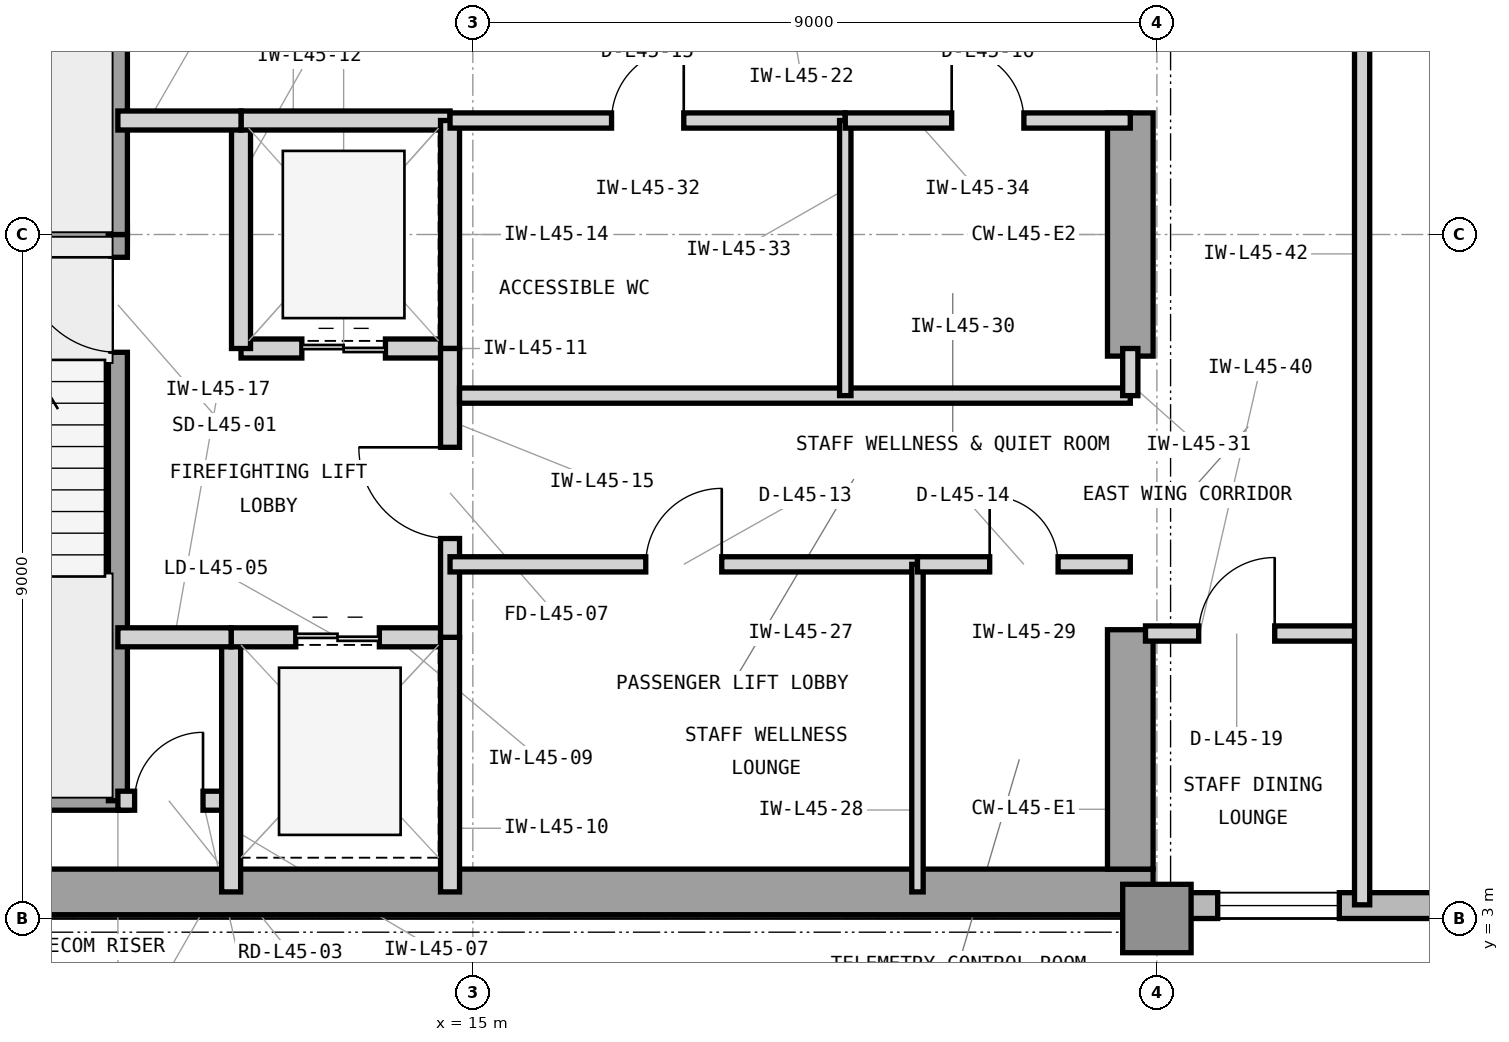
"""IFC4 building model, lengths in metres.
Left out: names, types, materials, properties, quantities, classifications, styles, units other than length and angle.
Written with IfcOpenShell. Run it as: python <this file> out.ifc"""

import sys

from ifc_helpers import new_model, si_unit, direction, frame, frame_2d, origin, origin_2d, place, context, subcontext, project, spatial, rectangle, extrude, element, fill, save


model = new_model("IFC4")
c1 = context("Model", 3, precision=1e-05, world=origin(), true_north=direction((0.0, 1.0)))
c2 = subcontext(c1, "Body", "Model", "MODEL_VIEW")
j1 = project(units=[si_unit("LENGTHUNIT", "METRE"), si_unit("PLANEANGLEUNIT", "RADIAN")], contexts=[c1])
p1 = place(None, origin())
s1 = spatial("IfcSite", under=j1, at=p1, CompositionType="ELEMENT")
p2 = place(p1, origin())
s2 = spatial("IfcBuilding", under=s1, at=p2, CompositionType="ELEMENT")
p3 = place(p2, frame((0.0, 0.0, 187.8)))
s3 = spatial("IfcBuildingStorey", under=s2, at=p3, CompositionType="ELEMENT", Elevation=187.8)
p4 = place(p3, frame((7.475, 3.35, 0.0), z_axis=(0.0, 0.0, 1.0), x_axis=(1.0, 0.0, 0.0)))
e1 = element("IfcWall", 1, at=p4, inside=s3, PredefinedType="SHEAR", context=c2, shape_type="SweptSolid", body=[
    extrude(rectangle(XDim=16.475, YDim=0.6, at=frame_2d((8.237, 0.0))), origin(), (0.0, 0.0, 1.0), 3.9),
])
p5 = place(p3, frame((23.65, 3.65, 0.0), z_axis=(0.0, 0.0, 1.0), x_axis=(0.0, 1.0, 0.0)))
e2 = element("IfcWall", 2, at=p5, inside=s3, PredefinedType="SHEAR", context=c2, shape_type="SweptSolid", body=[
    extrude(rectangle(XDim=3.15, YDim=0.6, at=frame_2d((1.575, 0.0))), origin(), (0.0, 0.0, 1.0), 3.9),
])
p6 = place(p3, frame((23.65, 10.4, 0.0), z_axis=(0.0, 0.0, 1.0), x_axis=(0.0, 1.0, 0.0)))
e3 = element("IfcWall", 3, at=p6, inside=s3, PredefinedType="SHEAR", context=c2, shape_type="SweptSolid", body=[
    extrude(rectangle(XDim=3.2, YDim=0.6, at=frame_2d((1.6, 0.0))), origin(), (0.0, 0.0, 1.0), 3.9),
])
p7 = place(p3, frame((24.0, 3.0, 0.0), z_axis=(0.0, 0.0, 1.0), x_axis=(1.0, 0.0, 0.0)))
e4 = element("IfcColumn", 4, at=p7, inside=s3, PredefinedType="COLUMN", context=c2, shape_type="SweptSolid", body=[
    extrude(rectangle(XDim=0.9, YDim=0.9, at=origin_2d()), origin(), (0.0, 0.0, 1.0), 3.9),
])
p8 = place(p3, frame((23.9, 3.17, 0.0), z_axis=(0.0, 0.0, 1.0), x_axis=(1.0, 0.0, 0.0)))
e5 = element("IfcWall", 5, at=p8, inside=s3, PredefinedType="STANDARD", context=c2, shape_type="SweptSolid", body=[
    extrude(rectangle(XDim=31.5, YDim=0.34, at=frame_2d((15.75, 0.0))), origin(), (0.0, 0.0, 1.0), 3.7),
])
p9 = place(p8, frame((5.6, 0.0, 0.9)))
e6 = element("IfcOpeningElement", 6, at=p9, cuts=e5, PredefinedType="OPENING", context=c2, shape_type="SweptSolid", body=[
    extrude(rectangle(XDim=2.3, YDim=2.2, at=frame_2d((1.15, 1.1))), frame((0.0, 0.18, 0.0), z_axis=(0.0, -1.0, 0.0), x_axis=(1.0, 0.0, 0.0)), (0.0, 0.0, 1.0), 0.36),
])
p10 = place(p8, frame((14.6, 0.0, 0.9)))
e7 = element("IfcOpeningElement", 7, at=p10, cuts=e5, PredefinedType="OPENING", context=c2, shape_type="SweptSolid", body=[
    extrude(rectangle(XDim=2.3, YDim=2.2, at=frame_2d((1.15, 1.1))), frame((0.0, 0.18, 0.0), z_axis=(0.0, -1.0, 0.0), x_axis=(1.0, 0.0, 0.0)), (0.0, 0.0, 1.0), 0.36),
])
p11 = place(p8, frame((19.1, 0.0, 0.9)))
e8 = element("IfcOpeningElement", 8, at=p11, cuts=e5, PredefinedType="OPENING", context=c2, shape_type="SweptSolid", body=[
    extrude(rectangle(XDim=2.3, YDim=2.2, at=frame_2d((1.15, 1.1))), frame((0.0, 0.18, 0.0), z_axis=(0.0, -1.0, 0.0), x_axis=(1.0, 0.0, 0.0)), (0.0, 0.0, 1.0), 0.36),
])
p12 = place(p8, frame((0.9, 0.0, 0.9)))
e9 = element("IfcOpeningElement", 9, at=p12, cuts=e5, PredefinedType="OPENING", context=c2, shape_type="SweptSolid", body=[
    extrude(rectangle(XDim=1.6, YDim=2.2, at=frame_2d((0.8, 1.1))), frame((0.0, 0.18, 0.0), z_axis=(0.0, -1.0, 0.0), x_axis=(1.0, 0.0, 0.0)), (0.0, 0.0, 1.0), 0.36),
])
p13 = place(p3, frame((6.35, 12.0, 0.0), z_axis=(0.0, 0.0, 1.0), x_axis=(1.0, 0.0, 0.0)))
e10 = element("IfcWall", 10, at=p13, inside=s3, PredefinedType="SHEAR", context=c2, shape_type="SweptSolid", body=[
    extrude(rectangle(XDim=4.105, YDim=0.25, at=frame_2d((2.052, 0.0))), origin(), (0.0, 0.0, 1.0), 3.9),
])
p14 = place(p3, frame((7.7, 4.55, 0.0), z_axis=(0.0, 0.0, 1.0), x_axis=(1.0, 0.0, 0.0)))
e11 = element("IfcWall", 11, at=p14, inside=s3, PredefinedType="SHEAR", context=c2, shape_type="SweptSolid", body=[
    extrude(rectangle(XDim=2.755, YDim=0.25, at=frame_2d((1.377, 0.0))), origin(), (0.0, 0.0, 1.0), 3.9),
])
p15 = place(p3, frame((10.33, 4.55, 0.0), z_axis=(0.0, 0.0, 1.0), x_axis=(0.0, 1.0, 0.0)))
e12 = element("IfcWall", 12, at=p15, inside=s3, PredefinedType="SHEAR", context=c2, shape_type="SweptSolid", body=[
    extrude(rectangle(XDim=7.45, YDim=0.25, at=frame_2d((3.725, 0.0))), origin(), (0.0, 0.0, 1.0), 3.9),
])
p16 = place(p15, frame((5.9, 0.0, 0.0)))
e13 = element("IfcOpeningElement", 13, at=p16, cuts=e12, PredefinedType="OPENING", context=c2, shape_type="SweptSolid", body=[
    extrude(rectangle(XDim=1.25, YDim=2.2, at=frame_2d((0.625, 1.1))), frame((0.0, 0.135, 0.0), z_axis=(0.0, -1.0, 0.0), x_axis=(1.0, 0.0, 0.0)), (0.0, 0.0, 1.0), 0.27),
])
p17 = place(p3, frame((10.33, 12.0, 0.0), z_axis=(0.0, 0.0, 1.0), x_axis=(0.0, 1.0, 0.0)))
e14 = element("IfcWall", 14, at=p17, inside=s3, PredefinedType="SHEAR", context=c2, shape_type="SweptSolid", body=[
    extrude(rectangle(XDim=7.45, YDim=0.25, at=frame_2d((3.725, 0.0))), origin(), (0.0, 0.0, 1.0), 3.9),
])
p18 = place(p17, frame((5.85, 0.0, 0.0)))
e15 = element("IfcOpeningElement", 15, at=p18, cuts=e14, PredefinedType="OPENING", context=c2, shape_type="SweptSolid", body=[
    extrude(rectangle(XDim=1.25, YDim=2.2, at=frame_2d((0.625, 1.1))), frame((0.0, 0.135, 0.0), z_axis=(0.0, -1.0, 0.0), x_axis=(1.0, 0.0, 0.0)), (0.0, 0.0, 1.0), 0.27),
])
p19 = place(p3, frame((10.33, 4.55, 0.0), z_axis=(0.0, 0.0, 1.0), x_axis=(1.0, 0.0, 0.0)))
e16 = element("IfcWall", 16, at=p19, inside=s3, PredefinedType="PARTITIONING", context=c2, shape_type="SweptSolid", body=[
    extrude(rectangle(XDim=1.49, YDim=0.25, at=frame_2d((0.745, 0.0))), origin(), (0.0, 0.0, 1.0), 3.69),
])
p20 = place(p19, frame((0.22, 0.0, 0.0)))
e17 = element("IfcOpeningElement", 17, at=p20, cuts=e16, PredefinedType="OPENING", context=c2, shape_type="SweptSolid", body=[
    extrude(rectangle(XDim=0.9, YDim=2.1, at=frame_2d((0.45, 1.05))), frame((0.0, 0.135, 0.0), z_axis=(0.0, -1.0, 0.0), x_axis=(1.0, 0.0, 0.0)), (0.0, 0.0, 1.0), 0.27),
])
p21 = place(p3, frame((11.82, 3.35, 0.0), z_axis=(0.0, 0.0, 1.0), x_axis=(0.0, 1.0, 0.0)))
e18 = element("IfcWall", 18, at=p21, inside=s3, PredefinedType="PARTITIONING", context=c2, shape_type="SweptSolid", body=[
    extrude(rectangle(XDim=3.35, YDim=0.25, at=frame_2d((1.675, 0.0))), origin(), (0.0, 0.0, 1.0), 3.69),
])
p22 = place(p3, frame((11.82, 6.7, 0.0), z_axis=(0.0, 0.0, 1.0), x_axis=(1.0, 0.0, 0.0)))
e19 = element("IfcWall", 19, at=p22, inside=s3, PredefinedType="PARTITIONING", context=c2, shape_type="SweptSolid", body=[
    extrude(rectangle(XDim=2.88, YDim=0.25, at=frame_2d((1.44, 0.0))), origin(), (0.0, 0.0, 1.0), 3.283),
])
p23 = place(p22, frame((0.85, 0.0, 0.0)))
e20 = element("IfcOpeningElement", 20, at=p23, cuts=e19, PredefinedType="OPENING", context=c2, shape_type="SweptSolid", body=[
    extrude(rectangle(XDim=1.1, YDim=2.25, at=frame_2d((0.55, 1.125))), frame((0.0, 0.135, 0.0), z_axis=(0.0, -1.0, 0.0), x_axis=(1.0, 0.0, 0.0)), (0.0, 0.0, 1.0), 0.27),
])
p24 = place(p3, frame((14.7, 3.35, 0.0), z_axis=(0.0, 0.0, 1.0), x_axis=(0.0, 1.0, 0.0)))
e21 = element("IfcWall", 21, at=p24, inside=s3, PredefinedType="PARTITIONING", context=c2, shape_type="SweptSolid", body=[
    extrude(rectangle(XDim=3.35, YDim=0.25, at=frame_2d((1.675, 0.0))), origin(), (0.0, 0.0, 1.0), 3.69),
])
p25 = place(p3, frame((11.95, 10.5, 0.0), z_axis=(0.0, 0.0, 1.0), x_axis=(1.0, 0.0, 0.0)))
e22 = element("IfcWall", 22, at=p25, inside=s3, PredefinedType="PARTITIONING", context=c2, shape_type="SweptSolid", body=[
    extrude(rectangle(XDim=2.75, YDim=0.25, at=frame_2d((1.375, 0.0))), origin(), (0.0, 0.0, 1.0), 3.283),
])
p26 = place(p25, frame((0.8, 0.0, 0.0)))
e23 = element("IfcOpeningElement", 23, at=p26, cuts=e22, PredefinedType="OPENING", context=c2, shape_type="SweptSolid", body=[
    extrude(rectangle(XDim=1.1, YDim=2.25, at=frame_2d((0.55, 1.125))), frame((0.0, 0.135, 0.0), z_axis=(0.0, -1.0, 0.0), x_axis=(1.0, 0.0, 0.0)), (0.0, 0.0, 1.0), 0.27),
])
p27 = place(p3, frame((11.95, 10.5, 0.0), z_axis=(0.0, 0.0, 1.0), x_axis=(0.0, 1.0, 0.0)))
e24 = element("IfcWall", 24, at=p27, inside=s3, PredefinedType="PARTITIONING", context=c2, shape_type="SweptSolid", body=[
    extrude(rectangle(XDim=3.0, YDim=0.25, at=frame_2d((1.5, 0.0))), origin(), (0.0, 0.0, 1.0), 3.69),
])
p28 = place(p3, frame((11.95, 13.5, 0.0), z_axis=(0.0, 0.0, 1.0), x_axis=(1.0, 0.0, 0.0)))
e25 = element("IfcWall", 25, at=p28, inside=s3, PredefinedType="PARTITIONING", context=c2, shape_type="SweptSolid", body=[
    extrude(rectangle(XDim=2.75, YDim=0.25, at=frame_2d((1.375, 0.0))), origin(), (0.0, 0.0, 1.0), 3.283),
])
p29 = place(p3, frame((14.7, 10.5, 0.0), z_axis=(0.0, 0.0, 1.0), x_axis=(0.0, 1.0, 0.0)))
e26 = element("IfcWall", 26, at=p29, inside=s3, PredefinedType="PARTITIONING", context=c2, shape_type="SweptSolid", body=[
    extrude(rectangle(XDim=3.0, YDim=0.25, at=frame_2d((1.5, 0.0))), origin(), (0.0, 0.0, 1.0), 3.69),
])
p30 = place(p3, frame((14.7, 6.7, 0.0), z_axis=(0.0, 0.0, 1.0), x_axis=(0.0, 1.0, 0.0)))
e27 = element("IfcWall", 27, at=p30, inside=s3, PredefinedType="PARTITIONING", context=c2, shape_type="SweptSolid", body=[
    extrude(rectangle(XDim=3.8, YDim=0.25, at=frame_2d((1.9, 0.0))), origin(), (0.0, 0.0, 1.0), 3.69),
])
p31 = place(p30, frame((1.3, 0.0, 0.0)))
e28 = element("IfcOpeningElement", 28, at=p31, cuts=e27, PredefinedType="OPENING", context=c2, shape_type="SweptSolid", body=[
    extrude(rectangle(XDim=1.2, YDim=2.2, at=frame_2d((0.6, 1.1))), frame((0.0, 0.135, 0.0), z_axis=(0.0, -1.0, 0.0), x_axis=(1.0, 0.0, 0.0)), (0.0, 0.0, 1.0), 0.27),
])
p32 = place(p3, frame((10.33, 13.5, 0.0), z_axis=(0.0, 0.0, 1.0), x_axis=(1.0, 0.0, 0.0)))
e29 = element("IfcWall", 29, at=p32, inside=s3, PredefinedType="PARTITIONING", context=c2, shape_type="SweptSolid", body=[
    extrude(rectangle(XDim=1.62, YDim=0.25, at=frame_2d((0.81, 0.0))), origin(), (0.0, 0.0, 1.0), 3.283),
])
p33 = place(p3, frame((10.33, 6.7, 0.0), z_axis=(0.0, 0.0, 1.0), x_axis=(1.0, 0.0, 0.0)))
e30 = element("IfcWall", 30, at=p33, inside=s3, PredefinedType="PARTITIONING", context=c2, shape_type="SweptSolid", body=[
    extrude(rectangle(XDim=1.49, YDim=0.25, at=frame_2d((0.745, 0.0))), origin(), (0.0, 0.0, 1.0), 3.283),
])
p34 = place(p3, frame((14.7, 7.66, 0.0), z_axis=(0.0, 0.0, 1.0), x_axis=(1.0, 0.0, 0.0)))
e31 = element("IfcWall", 31, at=p34, inside=s3, PredefinedType="PARTITIONING", context=c2, shape_type="SweptSolid", body=[
    extrude(rectangle(XDim=6.15, YDim=0.2, at=frame_2d((3.075, 0.0))), origin(), (0.0, 0.0, 1.0), 3.69),
])
p35 = place(p34, frame((2.575, 0.0, 0.0)))
e32 = element("IfcOpeningElement", 32, at=p35, cuts=e31, PredefinedType="OPENING", context=c2, shape_type="SweptSolid", body=[
    extrude(rectangle(XDim=1.0, YDim=2.15, at=frame_2d((0.5, 1.075))), frame((0.0, 0.11, 0.0), z_axis=(0.0, -1.0, 0.0), x_axis=(1.0, 0.0, 0.0)), (0.0, 0.0, 1.0), 0.22),
])
p36 = place(p3, frame((20.85, 3.35, 0.0), z_axis=(0.0, 0.0, 1.0), x_axis=(0.0, 1.0, 0.0)))
e33 = element("IfcWall", 33, at=p36, inside=s3, PredefinedType="PARTITIONING", context=c2, shape_type="SweptSolid", body=[
    extrude(rectangle(XDim=4.31, YDim=0.15, at=frame_2d((2.155, 0.0))), origin(), (0.0, 0.0, 1.0), 3.69),
])
p37 = place(p3, frame((20.85, 7.66, 0.0), z_axis=(0.0, 0.0, 1.0), x_axis=(1.0, 0.0, 0.0)))
e34 = element("IfcWall", 34, at=p37, inside=s3, PredefinedType="PARTITIONING", context=c2, shape_type="SweptSolid", body=[
    extrude(rectangle(XDim=2.8, YDim=0.2, at=frame_2d((1.4, 0.0))), origin(), (0.0, 0.0, 1.0), 3.69),
])
p38 = place(p37, frame((0.95, 0.0, 0.0)))
e35 = element("IfcOpeningElement", 35, at=p38, cuts=e34, PredefinedType="OPENING", context=c2, shape_type="SweptSolid", body=[
    extrude(rectangle(XDim=0.9, YDim=2.1, at=frame_2d((0.45, 1.05))), frame((0.0, 0.11, 0.0), z_axis=(0.0, -1.0, 0.0), x_axis=(1.0, 0.0, 0.0)), (0.0, 0.0, 1.0), 0.22),
])
p39 = place(p3, frame((14.825, 9.88, 0.0), z_axis=(0.0, 0.0, 1.0), x_axis=(1.0, 0.0, 0.0)))
e36 = element("IfcWall", 36, at=p39, inside=s3, PredefinedType="PARTITIONING", context=c2, shape_type="SweptSolid", body=[
    extrude(rectangle(XDim=8.825, YDim=0.2, at=frame_2d((4.413, 0.0))), origin(), (0.0, 0.0, 1.0), 3.69),
])
p40 = place(p3, frame((23.65, 9.88, 0.0), z_axis=(0.0, 0.0, 1.0), x_axis=(0.0, 1.0, 0.0)))
e37 = element("IfcWall", 37, at=p40, inside=s3, PredefinedType="PARTITIONING", context=c2, shape_type="SweptSolid", body=[
    extrude(rectangle(XDim=0.62, YDim=0.2, at=frame_2d((0.31, 0.0))), origin(), (0.0, 0.0, 1.0), 3.69),
])
p41 = place(p3, frame((14.7, 13.5, 0.0), z_axis=(0.0, 0.0, 1.0), x_axis=(1.0, 0.0, 0.0)))
e38 = element("IfcWall", 38, at=p41, inside=s3, PredefinedType="PARTITIONING", context=c2, shape_type="SweptSolid", body=[
    extrude(rectangle(XDim=5.2, YDim=0.2, at=frame_2d((2.6, 0.0))), origin(), (0.0, 0.0, 1.0), 3.283),
])
p42 = place(p41, frame((2.125, 0.0, 0.0)))
e39 = element("IfcOpeningElement", 39, at=p42, cuts=e38, PredefinedType="OPENING", context=c2, shape_type="SweptSolid", body=[
    extrude(rectangle(XDim=0.95, YDim=2.1, at=frame_2d((0.475, 1.05))), frame((0.0, 0.11, 0.0), z_axis=(0.0, -1.0, 0.0), x_axis=(1.0, 0.0, 0.0)), (0.0, 0.0, 1.0), 0.22),
])
p43 = place(p3, frame((19.9, 9.88, 0.0), z_axis=(0.0, 0.0, 1.0), x_axis=(0.0, 1.0, 0.0)))
e40 = element("IfcWall", 40, at=p43, inside=s3, PredefinedType="PARTITIONING", context=c2, shape_type="SweptSolid", body=[
    extrude(rectangle(XDim=3.62, YDim=0.15, at=frame_2d((1.81, 0.0))), origin(), (0.0, 0.0, 1.0), 3.69),
])
p44 = place(p3, frame((19.9, 13.5, 0.0), z_axis=(0.0, 0.0, 1.0), x_axis=(1.0, 0.0, 0.0)))
e41 = element("IfcWall", 41, at=p44, inside=s3, PredefinedType="PARTITIONING", context=c2, shape_type="SweptSolid", body=[
    extrude(rectangle(XDim=3.75, YDim=0.2, at=frame_2d((1.875, 0.0))), origin(), (0.0, 0.0, 1.0), 3.283),
])
p45 = place(p44, frame((1.4, 0.0, 0.0)))
e42 = element("IfcOpeningElement", 42, at=p45, cuts=e41, PredefinedType="OPENING", context=c2, shape_type="SweptSolid", body=[
    extrude(rectangle(XDim=0.95, YDim=2.1, at=frame_2d((0.475, 1.05))), frame((0.0, 0.11, 0.0), z_axis=(0.0, -1.0, 0.0), x_axis=(1.0, 0.0, 0.0)), (0.0, 0.0, 1.0), 0.22),
])
p46 = place(p3, frame((23.85, 6.75, 0.0), z_axis=(0.0, 0.0, 1.0), x_axis=(1.0, 0.0, 0.0)))
e43 = element("IfcWall", 43, at=p46, inside=s3, PredefinedType="PARTITIONING", context=c2, shape_type="SweptSolid", body=[
    extrude(rectangle(XDim=2.85, YDim=0.2, at=frame_2d((1.425, 0.0))), origin(), (0.0, 0.0, 1.0), 3.69),
])
p47 = place(p46, frame((0.7, 0.0, 0.0)))
e44 = element("IfcOpeningElement", 44, at=p47, cuts=e43, PredefinedType="OPENING", context=c2, shape_type="SweptSolid", body=[
    extrude(rectangle(XDim=1.0, YDim=2.15, at=frame_2d((0.5, 1.075))), frame((0.0, 0.11, 0.0), z_axis=(0.0, -1.0, 0.0), x_axis=(1.0, 0.0, 0.0)), (0.0, 0.0, 1.0), 0.22),
])
p48 = place(p3, frame((26.7, 3.18, 0.0), z_axis=(0.0, 0.0, 1.0), x_axis=(0.0, 1.0, 0.0)))
e45 = element("IfcWall", 45, at=p48, inside=s3, PredefinedType="PARTITIONING", context=c2, shape_type="SweptSolid", body=[
    extrude(rectangle(XDim=11.42, YDim=0.2, at=frame_2d((5.71, 0.0))), origin(), (0.0, 0.0, 1.0), 3.69),
])
p49 = place(p16, origin())
e46 = element("IfcDoor", 46, at=p49, inside=s3, OperationType="SINGLE_SWING_RIGHT", PredefinedType="DOOR", context=c2, shape_type="SweptSolid", body=[
    extrude(rectangle(XDim=1.25, YDim=2.2, at=frame_2d((0.625, 1.1))), frame((0.0, 0.025, 0.0), z_axis=(0.0, -1.0, 0.0), x_axis=(1.0, 0.0, 0.0)), (0.0, 0.0, 1.0), 0.05),
])
fill(e13, e46)
p50 = place(p20, origin())
e47 = element("IfcDoor", 47, at=p50, inside=s3, OperationType="SINGLE_SWING_RIGHT", PredefinedType="TRAPDOOR", context=c2, shape_type="SweptSolid", body=[
    extrude(rectangle(XDim=0.9, YDim=2.1, at=frame_2d((0.45, 1.05))), frame((0.0, 0.025, 0.0), z_axis=(0.0, -1.0, 0.0), x_axis=(1.0, 0.0, 0.0)), (0.0, 0.0, 1.0), 0.05),
])
fill(e17, e47)
p51 = place(p23, origin())
e48 = element("IfcDoor", 48, at=p51, inside=s3, OperationType="DOUBLE_DOOR_SLIDING", PredefinedType="DOOR", context=c2, shape_type="SweptSolid", body=[
    extrude(rectangle(XDim=1.1, YDim=2.25, at=frame_2d((0.55, 1.125))), frame((0.0, 0.025, 0.0), z_axis=(0.0, -1.0, 0.0), x_axis=(1.0, 0.0, 0.0)), (0.0, 0.0, 1.0), 0.05),
])
fill(e20, e48)
p52 = place(p26, origin())
e49 = element("IfcDoor", 49, at=p52, inside=s3, OperationType="DOUBLE_DOOR_SLIDING", PredefinedType="DOOR", context=c2, shape_type="SweptSolid", body=[
    extrude(rectangle(XDim=1.1, YDim=2.25, at=frame_2d((0.55, 1.125))), frame((0.0, 0.025, 0.0), z_axis=(0.0, -1.0, 0.0), x_axis=(1.0, 0.0, 0.0)), (0.0, 0.0, 1.0), 0.05),
])
fill(e23, e49)
p53 = place(p31, origin())
e50 = element("IfcDoor", 50, at=p53, inside=s3, OperationType="SINGLE_SWING_RIGHT", PredefinedType="DOOR", context=c2, shape_type="SweptSolid", body=[
    extrude(rectangle(XDim=1.2, YDim=2.2, at=frame_2d((0.6, 1.1))), frame((0.0, 0.025, 0.0), z_axis=(0.0, -1.0, 0.0), x_axis=(1.0, 0.0, 0.0)), (0.0, 0.0, 1.0), 0.05),
])
fill(e28, e50)
p54 = place(p35, origin())
e51 = element("IfcDoor", 51, at=p54, inside=s3, OperationType="SINGLE_SWING_RIGHT", PredefinedType="DOOR", context=c2, shape_type="SweptSolid", body=[
    extrude(rectangle(XDim=1.0, YDim=2.15, at=frame_2d((0.5, 1.075))), frame((0.0, 0.025, 0.0), z_axis=(0.0, -1.0, 0.0), x_axis=(1.0, 0.0, 0.0)), (0.0, 0.0, 1.0), 0.05),
])
fill(e32, e51)
p55 = place(p38, origin())
e52 = element("IfcDoor", 52, at=p55, inside=s3, OperationType="SINGLE_SWING_LEFT", PredefinedType="TRAPDOOR", context=c2, shape_type="SweptSolid", body=[
    extrude(rectangle(XDim=0.9, YDim=2.1, at=frame_2d((0.45, 1.05))), frame((0.0, 0.025, 0.0), z_axis=(0.0, -1.0, 0.0), x_axis=(1.0, 0.0, 0.0)), (0.0, 0.0, 1.0), 0.05),
])
fill(e35, e52)
p56 = place(p42, origin())
e53 = element("IfcDoor", 53, at=p56, inside=s3, OperationType="SINGLE_SWING_RIGHT", PredefinedType="DOOR", context=c2, shape_type="SweptSolid", body=[
    extrude(rectangle(XDim=0.95, YDim=2.1, at=frame_2d((0.475, 1.05))), frame((0.0, 0.025, 0.0), z_axis=(0.0, -1.0, 0.0), x_axis=(1.0, 0.0, 0.0)), (0.0, 0.0, 1.0), 0.05),
])
fill(e39, e53)
p57 = place(p45, origin())
e54 = element("IfcDoor", 54, at=p57, inside=s3, OperationType="SINGLE_SWING_LEFT", PredefinedType="DOOR", context=c2, shape_type="SweptSolid", body=[
    extrude(rectangle(XDim=0.95, YDim=2.1, at=frame_2d((0.475, 1.05))), frame((0.0, 0.025, 0.0), z_axis=(0.0, -1.0, 0.0), x_axis=(1.0, 0.0, 0.0)), (0.0, 0.0, 1.0), 0.05),
])
fill(e42, e54)
p58 = place(p47, origin())
e55 = element("IfcDoor", 55, at=p58, inside=s3, OperationType="SINGLE_SWING_RIGHT", PredefinedType="DOOR", context=c2, shape_type="SweptSolid", body=[
    extrude(rectangle(XDim=1.0, YDim=2.15, at=frame_2d((0.5, 1.075))), frame((0.0, 0.025, 0.0), z_axis=(0.0, -1.0, 0.0), x_axis=(1.0, 0.0, 0.0)), (0.0, 0.0, 1.0), 0.05),
])
fill(e44, e55)
p59 = place(p12, origin())
e56 = element("IfcWindow", 56, at=p59, inside=s3, PartitioningType="SINGLE_PANEL", PredefinedType="WINDOW", context=c2, shape_type="SweptSolid", body=[
    extrude(rectangle(XDim=1.6, YDim=2.2, at=frame_2d((0.8, 1.1))), frame((0.0, 0.11, 0.0), z_axis=(0.0, -1.0, 0.0), x_axis=(1.0, 0.0, 0.0)), (0.0, 0.0, 1.0), 0.06),
])
fill(e9, e56)
save(model, sys.argv[1])
